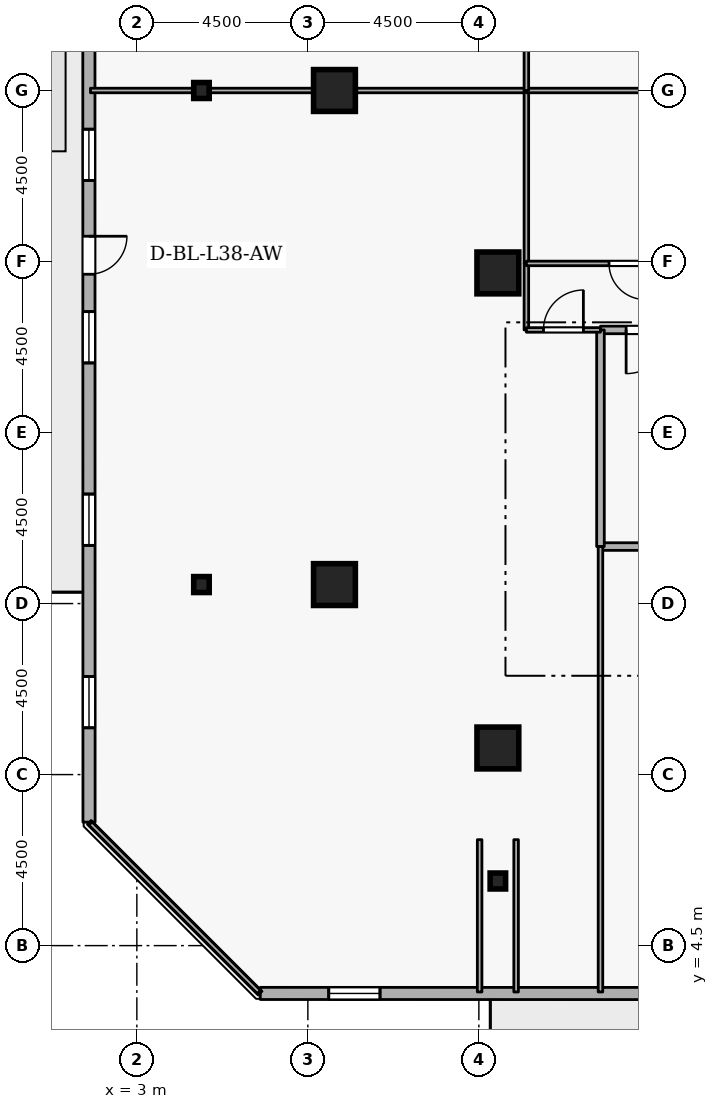
"""IFC4 building model, lengths in metres.
Left out: names, types, materials, properties, quantities, classifications, styles, units other than length and angle.
Written with IfcOpenShell. Run it as: python <this file> out.ifc"""

import sys

from ifc_helpers import new_model, si_unit, direction, frame, frame_2d, origin, origin_2d, place, context, subcontext, project, spatial, rectangle, i_section, extrude, element, fill, save


model = new_model("IFC4")
c1 = context("Model", 3, precision=1e-05, world=origin(), true_north=direction((0.0, 1.0)))
c2 = subcontext(c1, "Body", "Model", "MODEL_VIEW")
j1 = project(units=[si_unit("LENGTHUNIT", "METRE"), si_unit("PLANEANGLEUNIT", "RADIAN")], contexts=[c1])
p1 = place(None, origin())
s1 = spatial("IfcSite", under=j1, at=p1, CompositionType="ELEMENT")
p2 = place(p1, origin())
s2 = spatial("IfcBuilding", under=s1, at=p2, CompositionType="ELEMENT")
p3 = place(p2, frame((0.0, 0.0, 145.5)))
s3 = spatial("IfcBuildingStorey", under=s2, at=p3, CompositionType="ELEMENT", Elevation=145.5)
for number, where, z_axis, x_axis in (
    (1, (12.5, 9.7, 0.0), (0.0, 0.0, 1.0), (1.0, 0.0, 0.0)),
    (2, (8.2, 14.0, 0.0), (0.0, 0.0, 1.0), (1.0, 0.0, 0.0)),
    (3, (8.2, 27.0, 0.0), (0.0, 0.0, 1.0), (1.0, 0.0, 0.0)),
    (4, (12.5, 22.2, 0.0), (0.0, 0.0, 1.0), (1.0, 0.0, 0.0)),
):
    element("IfcColumn", number, at=place(p3, frame(where, z_axis=z_axis, x_axis=x_axis)), inside=s3, PredefinedType="COLUMN", context=c2, shape_type="SweptSolid", body=[
        extrude(rectangle(XDim=1.1, YDim=1.1, at=origin_2d()), origin(), (0.0, 0.0, 1.0), 3.6),
    ])
for number, where, z_axis, x_axis in (
    (5, (12.5, 6.2, 0.0), (0.0, 0.0, 1.0), (1.0, 0.0, 0.0)),
    (6, (4.7, 14.0, 0.0), (0.0, 0.0, 1.0), (1.0, 0.0, 0.0)),
    (7, (4.7, 27.0, 0.0), (0.0, 0.0, 1.0), (1.0, 0.0, 0.0)),
):
    element("IfcColumn", number, at=place(p3, frame(where, z_axis=z_axis, x_axis=x_axis)), inside=s3, PredefinedType="COLUMN", context=c2, shape_type="SweptSolid", body=[
        extrude(i_section(OverallWidth=0.407, OverallDepth=0.419, WebThickness=0.031, FlangeThickness=0.049, FilletRadius=0.015, at=origin_2d()), origin(), (0.0, 0.0, 1.0), 3.6),
    ])
p4 = place(p3, frame((6.249, 3.242, 0.0), z_axis=(0.0, 0.0, 1.0), x_axis=(0.999999983007, -0.000184351399, 0.0)))
e8 = element("IfcWall", 8, at=p4, inside=s3, PredefinedType="STANDARD", context=c2, shape_type="SweptSolid", body=[
    extrude(rectangle(XDim=34.432, YDim=0.32, at=frame_2d((17.216, 0.0))), origin(), (0.0, 0.0, 1.0), 2.22),
])
p5 = place(p4, frame((27.566, 0.0, 0.0)))
e9 = element("IfcOpeningElement", 9, at=p5, cuts=e8, PredefinedType="OPENING", context=c2, shape_type="SweptSolid", body=[
    extrude(rectangle(XDim=1.0, YDim=2.08, at=frame_2d((0.5, 1.04))), frame((0.0, 0.17, 0.0), z_axis=(0.0, -1.0, 0.0), x_axis=(1.0, 0.0, 0.0)), (0.0, 0.0, 1.0), 0.34),
])
p6 = place(p4, frame((1.8, 0.0, 0.72)))
e10 = element("IfcOpeningElement", 10, at=p6, cuts=e8, PredefinedType="OPENING", context=c2, shape_type="SweptSolid", body=[
    extrude(rectangle(XDim=1.35, YDim=1.05, at=frame_2d((0.675, 0.525))), frame((0.0, 0.17, 0.0), z_axis=(0.0, -1.0, 0.0), x_axis=(1.0, 0.0, 0.0)), (0.0, 0.0, 1.0), 0.34),
])
p7 = place(p4, frame((11.4, 0.0, 0.72)))
e11 = element("IfcOpeningElement", 11, at=p7, cuts=e8, PredefinedType="OPENING", context=c2, shape_type="SweptSolid", body=[
    extrude(rectangle(XDim=1.35, YDim=1.05, at=frame_2d((0.675, 0.525))), frame((0.0, 0.17, 0.0), z_axis=(0.0, -1.0, 0.0), x_axis=(1.0, 0.0, 0.0)), (0.0, 0.0, 1.0), 0.34),
])
p8 = place(p4, frame((16.2, 0.0, 0.72)))
e12 = element("IfcOpeningElement", 12, at=p8, cuts=e8, PredefinedType="OPENING", context=c2, shape_type="SweptSolid", body=[
    extrude(rectangle(XDim=1.35, YDim=1.05, at=frame_2d((0.675, 0.525))), frame((0.0, 0.17, 0.0), z_axis=(0.0, -1.0, 0.0), x_axis=(1.0, 0.0, 0.0)), (0.0, 0.0, 1.0), 0.34),
])
p9 = place(p4, frame((21.0, 0.0, 0.72)))
e13 = element("IfcOpeningElement", 13, at=p9, cuts=e8, PredefinedType="OPENING", context=c2, shape_type="SweptSolid", body=[
    extrude(rectangle(XDim=1.35, YDim=1.05, at=frame_2d((0.675, 0.525))), frame((0.0, 0.17, 0.0), z_axis=(0.0, -1.0, 0.0), x_axis=(1.0, 0.0, 0.0)), (0.0, 0.0, 1.0), 0.34),
])
p10 = place(p3, frame((1.735, 42.181, 0.0), z_axis=(0.0, 0.0, 1.0), x_axis=(0.000184351399, -0.999999983007, 0.0)))
e14 = element("IfcWall", 14, at=p10, inside=s3, PredefinedType="STANDARD", context=c2, shape_type="SweptSolid", body=[
    extrude(rectangle(XDim=34.432, YDim=0.32, at=frame_2d((17.216, 0.0))), origin(), (0.0, 0.0, 1.0), 2.22),
])
p11 = place(p10, frame((19.016, 0.0, 0.0)))
e15 = element("IfcOpeningElement", 15, at=p11, cuts=e14, PredefinedType="OPENING", context=c2, shape_type="SweptSolid", body=[
    extrude(rectangle(XDim=1.0, YDim=2.08, at=frame_2d((0.5, 1.04))), frame((0.0, 0.17, 0.0), z_axis=(0.0, -1.0, 0.0), x_axis=(1.0, 0.0, 0.0)), (0.0, 0.0, 1.0), 0.34),
])
p12 = place(p10, frame((1.8, 0.0, 0.72)))
e16 = element("IfcOpeningElement", 16, at=p12, cuts=e14, PredefinedType="OPENING", context=c2, shape_type="SweptSolid", body=[
    extrude(rectangle(XDim=1.35, YDim=1.05, at=frame_2d((0.675, 0.525))), frame((0.0, 0.17, 0.0), z_axis=(0.0, -1.0, 0.0), x_axis=(1.0, 0.0, 0.0)), (0.0, 0.0, 1.0), 0.34),
])
p13 = place(p10, frame((6.6, 0.0, 0.72)))
e17 = element("IfcOpeningElement", 17, at=p13, cuts=e14, PredefinedType="OPENING", context=c2, shape_type="SweptSolid", body=[
    extrude(rectangle(XDim=1.35, YDim=1.05, at=frame_2d((0.675, 0.525))), frame((0.0, 0.17, 0.0), z_axis=(0.0, -1.0, 0.0), x_axis=(1.0, 0.0, 0.0)), (0.0, 0.0, 1.0), 0.34),
])
p14 = place(p10, frame((11.4, 0.0, 0.72)))
e18 = element("IfcOpeningElement", 18, at=p14, cuts=e14, PredefinedType="OPENING", context=c2, shape_type="SweptSolid", body=[
    extrude(rectangle(XDim=1.35, YDim=1.05, at=frame_2d((0.675, 0.525))), frame((0.0, 0.17, 0.0), z_axis=(0.0, -1.0, 0.0), x_axis=(1.0, 0.0, 0.0)), (0.0, 0.0, 1.0), 0.34),
])
p15 = place(p10, frame((16.2, 0.0, 0.72)))
e19 = element("IfcOpeningElement", 19, at=p15, cuts=e14, PredefinedType="OPENING", context=c2, shape_type="SweptSolid", body=[
    extrude(rectangle(XDim=1.35, YDim=1.05, at=frame_2d((0.675, 0.525))), frame((0.0, 0.17, 0.0), z_axis=(0.0, -1.0, 0.0), x_axis=(1.0, 0.0, 0.0)), (0.0, 0.0, 1.0), 0.34),
])
p16 = place(p10, frame((21.0, 0.0, 0.72)))
e20 = element("IfcOpeningElement", 20, at=p16, cuts=e14, PredefinedType="OPENING", context=c2, shape_type="SweptSolid", body=[
    extrude(rectangle(XDim=1.35, YDim=1.05, at=frame_2d((0.675, 0.525))), frame((0.0, 0.17, 0.0), z_axis=(0.0, -1.0, 0.0), x_axis=(1.0, 0.0, 0.0)), (0.0, 0.0, 1.0), 0.34),
])
p17 = place(p10, frame((25.8, 0.0, 0.72)))
e21 = element("IfcOpeningElement", 21, at=p17, cuts=e14, PredefinedType="OPENING", context=c2, shape_type="SweptSolid", body=[
    extrude(rectangle(XDim=1.35, YDim=1.05, at=frame_2d((0.675, 0.525))), frame((0.0, 0.17, 0.0), z_axis=(0.0, -1.0, 0.0), x_axis=(1.0, 0.0, 0.0)), (0.0, 0.0, 1.0), 0.34),
])
p18 = place(p10, frame((30.6, 0.0, 0.72)))
e22 = element("IfcOpeningElement", 22, at=p18, cuts=e14, PredefinedType="OPENING", context=c2, shape_type="SweptSolid", body=[
    extrude(rectangle(XDim=1.35, YDim=1.05, at=frame_2d((0.675, 0.525))), frame((0.0, 0.17, 0.0), z_axis=(0.0, -1.0, 0.0), x_axis=(1.0, 0.0, 0.0)), (0.0, 0.0, 1.0), 0.34),
])
p19 = place(p3, frame((15.2, 15.0, 0.0), z_axis=(0.0, 0.0, 1.0), x_axis=(1.0, 0.0, 0.0)))
e23 = element("IfcWall", 23, at=p19, inside=s3, PredefinedType="STANDARD", context=c2, shape_type="SweptSolid", body=[
    extrude(rectangle(XDim=2.5, YDim=0.2, at=frame_2d((1.25, 0.0))), origin(), (0.0, 0.0, 1.0), 3.3),
])
p20 = place(p3, frame((17.7, 20.7, 0.0), z_axis=(0.0, 0.0, 1.0), x_axis=(-1.0, 0.0, 0.0)))
e24 = element("IfcWall", 24, at=p20, inside=s3, PredefinedType="STANDARD", context=c2, shape_type="SweptSolid", body=[
    extrude(rectangle(XDim=2.5, YDim=0.2, at=frame_2d((1.25, 0.0))), origin(), (0.0, 0.0, 1.0), 3.3),
])
p21 = place(p20, frame((0.675, 0.0, 0.0)))
e25 = element("IfcOpeningElement", 25, at=p21, cuts=e24, PredefinedType="OPENING", context=c2, shape_type="SweptSolid", body=[
    extrude(rectangle(XDim=1.15, YDim=2.1, at=frame_2d((0.575, 1.05))), frame((0.0, 0.11, 0.0), z_axis=(0.0, -1.0, 0.0), x_axis=(1.0, 0.0, 0.0)), (0.0, 0.0, 1.0), 0.22),
])
p22 = place(p3, frame((15.2, 20.7, 0.0), z_axis=(0.0, 0.0, 1.0), x_axis=(0.0, -1.0, 0.0)))
e26 = element("IfcWall", 26, at=p22, inside=s3, PredefinedType="STANDARD", context=c2, shape_type="SweptSolid", body=[
    extrude(rectangle(XDim=5.7, YDim=0.2, at=frame_2d((2.85, 0.0))), origin(), (0.0, 0.0, 1.0), 3.3),
])
p23 = place(p3, frame((13.25, 22.45, 0.0), z_axis=(0.0, 0.0, 1.0), x_axis=(0.0, -1.0, 0.0)))
e27 = element("IfcWall", 27, at=p23, inside=s3, PredefinedType="PARTITIONING", context=c2, shape_type="SweptSolid", body=[
    extrude(rectangle(XDim=1.75, YDim=0.12, at=frame_2d((0.875, 0.0))), origin(), (0.0, 0.0, 1.0), 3.3),
])
p24 = place(p3, frame((13.25, 20.7, 0.0), z_axis=(0.0, 0.0, 1.0), x_axis=(1.0, 0.0, 0.0)))
e28 = element("IfcWall", 28, at=p24, inside=s3, PredefinedType="PARTITIONING", context=c2, shape_type="SweptSolid", body=[
    extrude(rectangle(XDim=1.95, YDim=0.12, at=frame_2d((0.975, 0.0))), origin(), (0.0, 0.0, 1.0), 3.3),
])
p25 = place(p24, frame((0.45, 0.0, 0.0)))
e29 = element("IfcOpeningElement", 29, at=p25, cuts=e28, PredefinedType="OPENING", context=c2, shape_type="SweptSolid", body=[
    extrude(rectangle(XDim=1.05, YDim=2.1, at=frame_2d((0.525, 1.05))), frame((0.0, 0.07, 0.0), z_axis=(0.0, -1.0, 0.0), x_axis=(1.0, 0.0, 0.0)), (0.0, 0.0, 1.0), 0.14),
])
p26 = place(p3, frame((15.2, 15.0, 0.0), z_axis=(0.0, 0.0, 1.0), x_axis=(0.0, -1.0, 0.0)))
e30 = element("IfcWall", 30, at=p26, inside=s3, PredefinedType="PARTITIONING", context=c2, shape_type="SweptSolid", body=[
    extrude(rectangle(XDim=11.72, YDim=0.12, at=frame_2d((5.86, 0.0))), origin(), (0.0, 0.0, 1.0), 3.3),
])
for number, where, z_axis, x_axis in (
    (31, (12.98, 3.28, 0.0), (0.0, 0.0, 1.0), (0.0, 1.0, 0.0)),
    (32, (12.02, 7.287, 0.0), (0.0, 0.0, 1.0), (0.0, -1.0, 0.0)),
):
    element("IfcWall", number, at=place(p3, frame(where, z_axis=z_axis, x_axis=x_axis)), inside=s3, PredefinedType="PARTITIONING", context=c2, shape_type="SweptSolid", body=[
        extrude(rectangle(XDim=4.007, YDim=0.12, at=frame_2d((2.004, 0.0))), origin(), (0.0, 0.0, 1.0), 1.685),
    ])
p27 = place(p3, frame((6.213, 3.28, 0.0), z_axis=(0.0, 0.0, 1.0), x_axis=(-0.707106781187, 0.707106781187, 0.0)))
e33 = element("IfcWall", 33, at=p27, inside=s3, PredefinedType="PARTITIONING", context=c2, shape_type="SweptSolid", body=[
    extrude(rectangle(XDim=6.269, YDim=0.12, at=frame_2d((3.134, 0.0))), origin(), (0.0, 0.0, 1.0), 3.3),
])
p28 = place(p3, frame((1.78, 27.0, 0.0), z_axis=(0.0, 0.0, 1.0), x_axis=(1.0, 0.0, 0.0)))
e34 = element("IfcWall", 34, at=p28, inside=s3, PredefinedType="PARTITIONING", context=c2, shape_type="SweptSolid", body=[
    extrude(rectangle(XDim=11.47, YDim=0.12, at=frame_2d((5.735, 0.0))), origin(), (0.0, 0.0, 1.0), 2.842),
])
p29 = place(p3, frame((13.25, 27.0, 0.0), z_axis=(0.0, 0.0, 1.0), x_axis=(0.0, -1.0, 0.0)))
e35 = element("IfcWall", 35, at=p29, inside=s3, PredefinedType="PARTITIONING", context=c2, shape_type="SweptSolid", body=[
    extrude(rectangle(XDim=4.55, YDim=0.12, at=frame_2d((2.275, 0.0))), origin(), (0.0, 0.0, 1.0), 3.3),
])
p30 = place(p3, frame((13.25, 27.0, 0.0), z_axis=(0.0, 0.0, 1.0), x_axis=(1.0, 0.0, 0.0)))
e36 = element("IfcWall", 36, at=p30, inside=s3, PredefinedType="PARTITIONING", context=c2, shape_type="SweptSolid", body=[
    extrude(rectangle(XDim=5.3, YDim=0.12, at=frame_2d((2.65, 0.0))), origin(), (0.0, 0.0, 1.0), 3.3),
])
p31 = place(p3, frame((18.55, 22.45, 0.0), z_axis=(0.0, 0.0, 1.0), x_axis=(-1.0, 0.0, 0.0)))
e37 = element("IfcWall", 37, at=p31, inside=s3, PredefinedType="PARTITIONING", context=c2, shape_type="SweptSolid", body=[
    extrude(rectangle(XDim=5.3, YDim=0.12, at=frame_2d((2.65, 0.0))), origin(), (0.0, 0.0, 1.0), 3.3),
])
p32 = place(p31, frame((2.175, 0.0, 0.0)))
e38 = element("IfcOpeningElement", 38, at=p32, cuts=e37, PredefinedType="OPENING", context=c2, shape_type="SweptSolid", body=[
    extrude(rectangle(XDim=0.95, YDim=2.1, at=frame_2d((0.475, 1.05))), frame((0.0, 0.07, 0.0), z_axis=(0.0, -1.0, 0.0), x_axis=(1.0, 0.0, 0.0)), (0.0, 0.0, 1.0), 0.14),
])
p33 = place(p3, frame((13.25, 27.0, 0.0), z_axis=(0.0, 0.0, 1.0), x_axis=(0.0, 1.0, 0.0)))
e39 = element("IfcWall", 39, at=p33, inside=s3, PredefinedType="PARTITIONING", context=c2, shape_type="SweptSolid", body=[
    extrude(rectangle(XDim=2.3, YDim=0.12, at=frame_2d((1.15, 0.0))), origin(), (0.0, 0.0, 1.0), 3.3),
])
p34 = place(p6, origin())
e40 = element("IfcWindow", 40, at=p34, inside=s3, PartitioningType="SINGLE_PANEL", PredefinedType="WINDOW", context=c2, shape_type="SweptSolid", body=[
    extrude(rectangle(XDim=1.35, YDim=1.05, at=frame_2d((0.675, 0.525))), frame((0.0, 0.03, 0.0), z_axis=(0.0, -1.0, 0.0), x_axis=(1.0, 0.0, 0.0)), (0.0, 0.0, 1.0), 0.06),
])
fill(e10, e40)
p35 = place(p11, origin())
e41 = element("IfcDoor", 41, at=p35, inside=s3, OperationType="SINGLE_SWING_LEFT", PredefinedType="DOOR", context=c2, shape_type="SweptSolid", body=[
    extrude(rectangle(XDim=1.0, YDim=2.08, at=frame_2d((0.5, 1.04))), frame((0.0, 0.025, 0.0), z_axis=(0.0, -1.0, 0.0), x_axis=(1.0, 0.0, 0.0)), (0.0, 0.0, 1.0), 0.05),
])
fill(e15, e41)
p36 = place(p15, origin())
e42 = element("IfcWindow", 42, at=p36, inside=s3, PartitioningType="SINGLE_PANEL", PredefinedType="WINDOW", context=c2, shape_type="SweptSolid", body=[
    extrude(rectangle(XDim=1.35, YDim=1.05, at=frame_2d((0.675, 0.525))), frame((0.0, 0.03, 0.0), z_axis=(0.0, -1.0, 0.0), x_axis=(1.0, 0.0, 0.0)), (0.0, 0.0, 1.0), 0.06),
])
fill(e19, e42)
p37 = place(p16, origin())
e43 = element("IfcWindow", 43, at=p37, inside=s3, PartitioningType="SINGLE_PANEL", PredefinedType="WINDOW", context=c2, shape_type="SweptSolid", body=[
    extrude(rectangle(XDim=1.35, YDim=1.05, at=frame_2d((0.675, 0.525))), frame((0.0, 0.03, 0.0), z_axis=(0.0, -1.0, 0.0), x_axis=(1.0, 0.0, 0.0)), (0.0, 0.0, 1.0), 0.06),
])
fill(e20, e43)
p38 = place(p17, origin())
e44 = element("IfcWindow", 44, at=p38, inside=s3, PartitioningType="SINGLE_PANEL", PredefinedType="WINDOW", context=c2, shape_type="SweptSolid", body=[
    extrude(rectangle(XDim=1.35, YDim=1.05, at=frame_2d((0.675, 0.525))), frame((0.0, 0.03, 0.0), z_axis=(0.0, -1.0, 0.0), x_axis=(1.0, 0.0, 0.0)), (0.0, 0.0, 1.0), 0.06),
])
fill(e21, e44)
p39 = place(p18, origin())
e45 = element("IfcWindow", 45, at=p39, inside=s3, PartitioningType="SINGLE_PANEL", PredefinedType="WINDOW", context=c2, shape_type="SweptSolid", body=[
    extrude(rectangle(XDim=1.35, YDim=1.05, at=frame_2d((0.675, 0.525))), frame((0.0, 0.03, 0.0), z_axis=(0.0, -1.0, 0.0), x_axis=(1.0, 0.0, 0.0)), (0.0, 0.0, 1.0), 0.06),
])
fill(e22, e45)
p40 = place(p21, origin())
e46 = element("IfcDoor", 46, at=p40, inside=s3, OperationType="SINGLE_SWING_RIGHT", PredefinedType="DOOR", context=c2, shape_type="SweptSolid", body=[
    extrude(rectangle(XDim=1.15, YDim=2.1, at=frame_2d((0.575, 1.05))), frame((0.0, 0.025, 0.0), z_axis=(0.0, -1.0, 0.0), x_axis=(1.0, 0.0, 0.0)), (0.0, 0.0, 1.0), 0.05),
])
fill(e25, e46)
p41 = place(p25, origin())
e47 = element("IfcDoor", 47, at=p41, inside=s3, OperationType="SINGLE_SWING_RIGHT", PredefinedType="DOOR", context=c2, shape_type="SweptSolid", body=[
    extrude(rectangle(XDim=1.05, YDim=2.1, at=frame_2d((0.525, 1.05))), frame((0.0, 0.025, 0.0), z_axis=(0.0, -1.0, 0.0), x_axis=(1.0, 0.0, 0.0)), (0.0, 0.0, 1.0), 0.05),
])
fill(e29, e47)
p42 = place(p32, origin())
e48 = element("IfcDoor", 48, at=p42, inside=s3, OperationType="SINGLE_SWING_LEFT", PredefinedType="DOOR", context=c2, shape_type="SweptSolid", body=[
    extrude(rectangle(XDim=0.95, YDim=2.1, at=frame_2d((0.475, 1.05))), frame((0.0, 0.025, 0.0), z_axis=(0.0, -1.0, 0.0), x_axis=(1.0, 0.0, 0.0)), (0.0, 0.0, 1.0), 0.05),
])
fill(e38, e48)
save(model, sys.argv[1])
